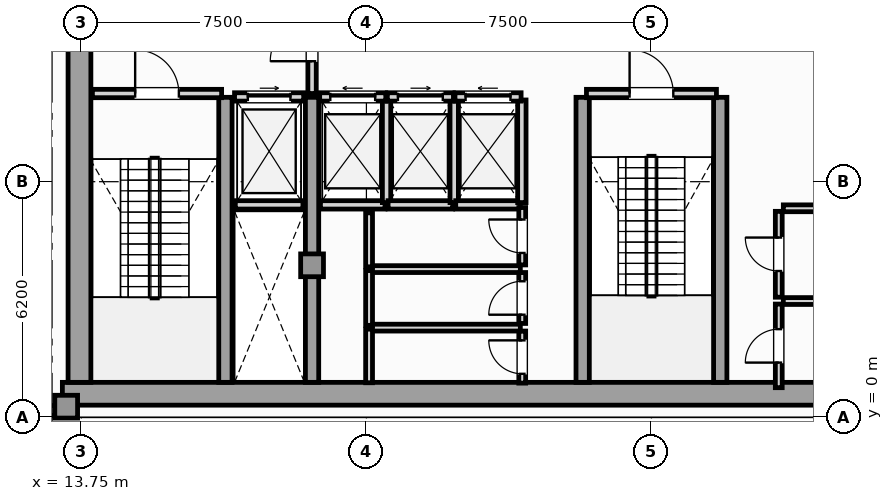
"""IFC4 building model, lengths in metres.
Left out: names, types, materials, properties, quantities, classifications, styles, units other than length and angle.
Written with IfcOpenShell. Run it as: python <this file> out.ifc"""

import sys

from ifc_helpers import new_model, si_unit, direction, frame, frame_2d, origin, origin_2d, place, context, subcontext, project, spatial, rectangle, extrude, element, fill, save


model = new_model("IFC4")
c1 = context("Model", 3, precision=1e-05, world=origin(), true_north=direction((0.0, 1.0)))
c2 = subcontext(c1, "Body", "Model", "MODEL_VIEW")
j1 = project(units=[si_unit("LENGTHUNIT", "METRE"), si_unit("PLANEANGLEUNIT", "RADIAN")], contexts=[c1])
p1 = place(None, origin())
s1 = spatial("IfcSite", under=j1, at=p1, CompositionType="ELEMENT")
p2 = place(p1, origin())
s2 = spatial("IfcBuilding", under=s1, at=p2, CompositionType="ELEMENT")
p3 = place(p2, frame((0.0, 0.0, 251.7)))
s3 = spatial("IfcBuildingStorey", under=s2, at=p3, CompositionType="ELEMENT", Elevation=251.7)
p4 = place(p3, frame((13.25, 0.62, 0.0), z_axis=(0.0, 0.0, 1.0), x_axis=(1.0, 0.0, 0.0)))
e1 = element("IfcWall", 1, at=p4, inside=s3, PredefinedType="SHEAR", context=c2, shape_type="SweptSolid", body=[
    extrude(rectangle(XDim=31.0, YDim=0.6, at=frame_2d((15.5, 0.0))), origin(), (0.0, 0.0, 1.0), 4.85),
])
p5 = place(p3, frame((13.7, 0.92, 0.0), z_axis=(0.0, 0.0, 1.0), x_axis=(0.0, 1.0, 0.0)))
e2 = element("IfcWall", 2, at=p5, inside=s3, PredefinedType="SHEAR", context=c2, shape_type="SweptSolid", body=[
    extrude(rectangle(XDim=10.53, YDim=0.6, at=frame_2d((5.265, 0.0))), origin(), (0.0, 0.0, 1.0), 4.85),
])
for number, where, z_axis, x_axis in (
    (3, (17.54, 0.92, 0.0), (0.0, 0.0, 1.0), (0.0, 1.0, 0.0)),
    (4, (19.82, 0.92, 0.0), (0.0, 0.0, 1.0), (0.0, 1.0, 0.0)),
    (5, (26.94, 0.92, 0.0), (0.0, 0.0, 1.0), (0.0, 1.0, 0.0)),
    (6, (30.56, 0.92, 0.0), (0.0, 0.0, 1.0), (0.0, 1.0, 0.0)),
):
    element("IfcWall", number, at=place(p3, frame(where, z_axis=z_axis, x_axis=x_axis)), inside=s3, PredefinedType="SHEAR", context=c2, shape_type="SweptSolid", body=[
        extrude(rectangle(XDim=7.5, YDim=0.35, at=frame_2d((3.75, 0.0))), origin(), (0.0, 0.0, 1.0), 4.85),
    ])
for number, where, z_axis, x_axis in (
    (7, (13.35, 0.28, 0.0), (0.0, 0.0, 1.0), (1.0, 0.0, 0.0)),
    (8, (19.82, 4.0, 0.0), (0.0, 0.0, 1.0), (1.0, 0.0, 0.0)),
):
    element("IfcColumn", number, at=place(p3, frame(where, z_axis=z_axis, x_axis=x_axis)), inside=s3, PredefinedType="COLUMN", context=c2, shape_type="SweptSolid", body=[
        extrude(rectangle(XDim=0.6, YDim=0.6, at=origin_2d()), origin(), (0.0, 0.0, 1.0), 5.05),
    ])
p6 = place(p3, frame((11.095, 0.18, 0.0), z_axis=(0.0, 0.0, 1.0), x_axis=(1.0, 0.0, 0.0)))
e9 = element("IfcWall", 9, at=p6, inside=s3, PredefinedType="SOLIDWALL", context=c2, shape_type="SweptSolid", body=[
    extrude(rectangle(XDim=2.155, YDim=0.26, at=frame_2d((1.077, 0.0))), origin(), (0.0, 0.0, 1.0), 4.85),
])
p7 = place(p3, frame((17.8, 5.59, 0.0), z_axis=(0.0, 0.0, 1.0), x_axis=(1.0, 0.0, 0.0)))
e10 = element("IfcWall", 10, at=p7, inside=s3, PredefinedType="SOLIDWALL", context=c2, shape_type="SweptSolid", body=[
    extrude(rectangle(XDim=1.78, YDim=0.22, at=frame_2d((0.89, 0.0))), origin(), (0.0, 0.0, 1.0), 4.85),
])
p8 = place(p3, frame((17.78, 8.43, 0.0), z_axis=(0.0, 0.0, 1.0), x_axis=(1.0, 0.0, 0.0)))
e11 = element("IfcWall", 11, at=p8, inside=s3, PredefinedType="SOLIDWALL", context=c2, shape_type="SweptSolid", body=[
    extrude(rectangle(XDim=1.82, YDim=0.22, at=frame_2d((0.91, 0.0))), origin(), (0.0, 0.0, 1.0), 4.85),
])
p9 = place(p8, frame((0.35, 0.0, 0.0)))
e12 = element("IfcOpeningElement", 12, at=p9, cuts=e11, PredefinedType="OPENING", context=c2, shape_type="SweptSolid", body=[
    extrude(rectangle(XDim=1.12, YDim=2.25, at=frame_2d((0.56, 1.125))), frame((0.0, 0.12, 0.0), z_axis=(0.0, -1.0, 0.0), x_axis=(1.0, 0.0, 0.0)), (0.0, 0.0, 1.0), 0.24),
])
p10 = place(p3, frame((20.04, 5.59, 0.0), z_axis=(0.0, 0.0, 1.0), x_axis=(1.0, 0.0, 0.0)))
e13 = element("IfcWall", 13, at=p10, inside=s3, PredefinedType="SOLIDWALL", context=c2, shape_type="SweptSolid", body=[
    extrude(rectangle(XDim=1.7, YDim=0.22, at=frame_2d((0.85, 0.0))), origin(), (0.0, 0.0, 1.0), 4.85),
])
p11 = place(p3, frame((21.78, 5.65, 0.0), z_axis=(0.0, 0.0, 1.0), x_axis=(0.0, 1.0, 0.0)))
e14 = element("IfcWall", 14, at=p11, inside=s3, PredefinedType="SOLIDWALL", context=c2, shape_type="SweptSolid", body=[
    extrude(rectangle(XDim=2.7, YDim=0.22, at=frame_2d((1.35, 0.0))), origin(), (0.0, 0.0, 1.0), 4.85),
])
p12 = place(p3, frame((20.02, 8.43, 0.0), z_axis=(0.0, 0.0, 1.0), x_axis=(1.0, 0.0, 0.0)))
e15 = element("IfcWall", 15, at=p12, inside=s3, PredefinedType="SOLIDWALL", context=c2, shape_type="SweptSolid", body=[
    extrude(rectangle(XDim=1.74, YDim=0.22, at=frame_2d((0.87, 0.0))), origin(), (0.0, 0.0, 1.0), 4.85),
])
p13 = place(p12, frame((0.28, 0.0, 0.0)))
e16 = element("IfcOpeningElement", 16, at=p13, cuts=e15, PredefinedType="OPENING", context=c2, shape_type="SweptSolid", body=[
    extrude(rectangle(XDim=1.18, YDim=2.2, at=frame_2d((0.59, 1.1))), frame((0.0, 0.12, 0.0), z_axis=(0.0, -1.0, 0.0), x_axis=(1.0, 0.0, 0.0)), (0.0, 0.0, 1.0), 0.24),
])
p14 = place(p3, frame((21.82, 5.59, 0.0), z_axis=(0.0, 0.0, 1.0), x_axis=(1.0, 0.0, 0.0)))
e17 = element("IfcWall", 17, at=p14, inside=s3, PredefinedType="SOLIDWALL", context=c2, shape_type="SweptSolid", body=[
    extrude(rectangle(XDim=1.7, YDim=0.22, at=frame_2d((0.85, 0.0))), origin(), (0.0, 0.0, 1.0), 4.85),
])
p15 = place(p3, frame((23.56, 5.65, 0.0), z_axis=(0.0, 0.0, 1.0), x_axis=(0.0, 1.0, 0.0)))
e18 = element("IfcWall", 18, at=p15, inside=s3, PredefinedType="SOLIDWALL", context=c2, shape_type="SweptSolid", body=[
    extrude(rectangle(XDim=2.7, YDim=0.22, at=frame_2d((1.35, 0.0))), origin(), (0.0, 0.0, 1.0), 4.85),
])
p16 = place(p3, frame((21.8, 8.43, 0.0), z_axis=(0.0, 0.0, 1.0), x_axis=(1.0, 0.0, 0.0)))
e19 = element("IfcWall", 19, at=p16, inside=s3, PredefinedType="SOLIDWALL", context=c2, shape_type="SweptSolid", body=[
    extrude(rectangle(XDim=1.74, YDim=0.22, at=frame_2d((0.87, 0.0))), origin(), (0.0, 0.0, 1.0), 4.85),
])
p17 = place(p16, frame((0.28, 0.0, 0.0)))
e20 = element("IfcOpeningElement", 20, at=p17, cuts=e19, PredefinedType="OPENING", context=c2, shape_type="SweptSolid", body=[
    extrude(rectangle(XDim=1.18, YDim=2.2, at=frame_2d((0.59, 1.1))), frame((0.0, 0.12, 0.0), z_axis=(0.0, -1.0, 0.0), x_axis=(1.0, 0.0, 0.0)), (0.0, 0.0, 1.0), 0.24),
])
p18 = place(p3, frame((23.6, 5.59, 0.0), z_axis=(0.0, 0.0, 1.0), x_axis=(1.0, 0.0, 0.0)))
e21 = element("IfcWall", 21, at=p18, inside=s3, PredefinedType="SOLIDWALL", context=c2, shape_type="SweptSolid", body=[
    extrude(rectangle(XDim=1.7, YDim=0.22, at=frame_2d((0.85, 0.0))), origin(), (0.0, 0.0, 1.0), 4.85),
])
p19 = place(p3, frame((25.34, 5.65, 0.0), z_axis=(0.0, 0.0, 1.0), x_axis=(0.0, 1.0, 0.0)))
e22 = element("IfcWall", 22, at=p19, inside=s3, PredefinedType="SOLIDWALL", context=c2, shape_type="SweptSolid", body=[
    extrude(rectangle(XDim=2.7, YDim=0.22, at=frame_2d((1.35, 0.0))), origin(), (0.0, 0.0, 1.0), 4.85),
])
p20 = place(p3, frame((23.58, 8.43, 0.0), z_axis=(0.0, 0.0, 1.0), x_axis=(1.0, 0.0, 0.0)))
e23 = element("IfcWall", 23, at=p20, inside=s3, PredefinedType="SOLIDWALL", context=c2, shape_type="SweptSolid", body=[
    extrude(rectangle(XDim=1.74, YDim=0.22, at=frame_2d((0.87, 0.0))), origin(), (0.0, 0.0, 1.0), 4.85),
])
p21 = place(p20, frame((0.28, 0.0, 0.0)))
e24 = element("IfcOpeningElement", 24, at=p21, cuts=e23, PredefinedType="OPENING", context=c2, shape_type="SweptSolid", body=[
    extrude(rectangle(XDim=1.18, YDim=2.2, at=frame_2d((0.59, 1.1))), frame((0.0, 0.12, 0.0), z_axis=(0.0, -1.0, 0.0), x_axis=(1.0, 0.0, 0.0)), (0.0, 0.0, 1.0), 0.24),
])
p22 = place(p3, frame((14.04, 8.52, 0.0), z_axis=(0.0, 0.0, 1.0), x_axis=(1.0, 0.0, 0.0)))
e25 = element("IfcWall", 25, at=p22, inside=s3, PredefinedType="SOLIDWALL", context=c2, shape_type="SweptSolid", body=[
    extrude(rectangle(XDim=3.4, YDim=0.22, at=frame_2d((1.7, 0.0))), origin(), (0.0, 0.0, 1.0), 4.85),
])
p23 = place(p22, frame((1.125, 0.0, 0.0)))
e26 = element("IfcOpeningElement", 26, at=p23, cuts=e25, PredefinedType="OPENING", context=c2, shape_type="SweptSolid", body=[
    extrude(rectangle(XDim=1.15, YDim=2.2, at=frame_2d((0.575, 1.1))), frame((0.0, 0.12, 0.0), z_axis=(0.0, -1.0, 0.0), x_axis=(1.0, 0.0, 0.0)), (0.0, 0.0, 1.0), 0.24),
])
p24 = place(p3, frame((27.04, 8.52, 0.0), z_axis=(0.0, 0.0, 1.0), x_axis=(1.0, 0.0, 0.0)))
e27 = element("IfcWall", 27, at=p24, inside=s3, PredefinedType="SOLIDWALL", context=c2, shape_type="SweptSolid", body=[
    extrude(rectangle(XDim=3.42, YDim=0.22, at=frame_2d((1.71, 0.0))), origin(), (0.0, 0.0, 1.0), 4.85),
])
p25 = place(p24, frame((1.135, 0.0, 0.0)))
e28 = element("IfcOpeningElement", 28, at=p25, cuts=e27, PredefinedType="OPENING", context=c2, shape_type="SweptSolid", body=[
    extrude(rectangle(XDim=1.15, YDim=2.2, at=frame_2d((0.575, 1.1))), frame((0.0, 0.12, 0.0), z_axis=(0.0, -1.0, 0.0), x_axis=(1.0, 0.0, 0.0)), (0.0, 0.0, 1.0), 0.24),
])
p26 = place(p3, frame((19.82, 8.52, 0.0), z_axis=(0.0, 0.0, 1.0), x_axis=(0.0, 1.0, 0.0)))
e29 = element("IfcWall", 29, at=p26, inside=s3, PredefinedType="SOLIDWALL", context=c2, shape_type="SweptSolid", body=[
    extrude(rectangle(XDim=2.8, YDim=0.22, at=frame_2d((1.4, 0.0))), origin(), (0.0, 0.0, 1.0), 4.306),
])
p27 = place(p26, frame((0.85, 0.0, 0.0)))
e30 = element("IfcOpeningElement", 30, at=p27, cuts=e29, PredefinedType="OPENING", context=c2, shape_type="SweptSolid", body=[
    extrude(rectangle(XDim=1.1, YDim=2.2, at=frame_2d((0.55, 1.1))), frame((0.0, 0.12, 0.0), z_axis=(0.0, -1.0, 0.0), x_axis=(1.0, 0.0, 0.0)), (0.0, 0.0, 1.0), 0.24),
])
p28 = place(p3, frame((25.35, 0.9, 0.0), z_axis=(0.0, 0.0, 1.0), x_axis=(0.0, 1.0, 0.0)))
e31 = element("IfcWall", 31, at=p28, inside=s3, PredefinedType="PARTITIONING", context=c2, shape_type="SweptSolid", body=[
    extrude(rectangle(XDim=1.37, YDim=0.18, at=frame_2d((0.685, 0.0))), origin(), (0.0, 0.0, 1.0), 4.85),
])
p29 = place(p28, frame((0.245, 0.0, 0.0)))
e32 = element("IfcOpeningElement", 32, at=p29, cuts=e31, PredefinedType="OPENING", context=c2, shape_type="SweptSolid", body=[
    extrude(rectangle(XDim=0.88, YDim=2.05, at=frame_2d((0.44, 1.025))), frame((0.0, 0.1, 0.0), z_axis=(0.0, -1.0, 0.0), x_axis=(1.0, 0.0, 0.0)), (0.0, 0.0, 1.0), 0.2),
])
p30 = place(p3, frame((21.36, 2.36, 0.0), z_axis=(0.0, 0.0, 1.0), x_axis=(1.0, 0.0, 0.0)))
e33 = element("IfcWall", 33, at=p30, inside=s3, PredefinedType="PARTITIONING", context=c2, shape_type="SweptSolid", body=[
    extrude(rectangle(XDim=3.94, YDim=0.18, at=frame_2d((1.97, 0.0))), origin(), (0.0, 0.0, 1.0), 4.85),
])
p31 = place(p3, frame((21.32, 0.91, 0.0), z_axis=(0.0, 0.0, 1.0), x_axis=(0.0, 1.0, 0.0)))
e34 = element("IfcWall", 34, at=p31, inside=s3, PredefinedType="PARTITIONING", context=c2, shape_type="SweptSolid", body=[
    extrude(rectangle(XDim=1.41, YDim=0.18, at=frame_2d((0.705, 0.0))), origin(), (0.0, 0.0, 1.0), 4.85),
])
p32 = place(p3, frame((25.35, 2.47, 0.0), z_axis=(0.0, 0.0, 1.0), x_axis=(0.0, 1.0, 0.0)))
e35 = element("IfcWall", 35, at=p32, inside=s3, PredefinedType="PARTITIONING", context=c2, shape_type="SweptSolid", body=[
    extrude(rectangle(XDim=1.34, YDim=0.18, at=frame_2d((0.67, 0.0))), origin(), (0.0, 0.0, 1.0), 4.85),
])
p33 = place(p32, frame((0.23, 0.0, 0.0)))
e36 = element("IfcOpeningElement", 36, at=p33, cuts=e35, PredefinedType="OPENING", context=c2, shape_type="SweptSolid", body=[
    extrude(rectangle(XDim=0.88, YDim=2.05, at=frame_2d((0.44, 1.025))), frame((0.0, 0.1, 0.0), z_axis=(0.0, -1.0, 0.0), x_axis=(1.0, 0.0, 0.0)), (0.0, 0.0, 1.0), 0.2),
])
p34 = place(p3, frame((21.36, 3.9, 0.0), z_axis=(0.0, 0.0, 1.0), x_axis=(1.0, 0.0, 0.0)))
e37 = element("IfcWall", 37, at=p34, inside=s3, PredefinedType="PARTITIONING", context=c2, shape_type="SweptSolid", body=[
    extrude(rectangle(XDim=3.94, YDim=0.18, at=frame_2d((1.97, 0.0))), origin(), (0.0, 0.0, 1.0), 4.85),
])
p35 = place(p3, frame((21.32, 2.42, 0.0), z_axis=(0.0, 0.0, 1.0), x_axis=(0.0, 1.0, 0.0)))
e38 = element("IfcWall", 38, at=p35, inside=s3, PredefinedType="PARTITIONING", context=c2, shape_type="SweptSolid", body=[
    extrude(rectangle(XDim=1.44, YDim=0.18, at=frame_2d((0.72, 0.0))), origin(), (0.0, 0.0, 1.0), 4.85),
])
p36 = place(p3, frame((25.35, 4.01, 0.0), z_axis=(0.0, 0.0, 1.0), x_axis=(0.0, 1.0, 0.0)))
e39 = element("IfcWall", 39, at=p36, inside=s3, PredefinedType="PARTITIONING", context=c2, shape_type="SweptSolid", body=[
    extrude(rectangle(XDim=1.51, YDim=0.18, at=frame_2d((0.755, 0.0))), origin(), (0.0, 0.0, 1.0), 4.85),
])
p37 = place(p36, frame((0.315, 0.0, 0.0)))
e40 = element("IfcOpeningElement", 40, at=p37, cuts=e39, PredefinedType="OPENING", context=c2, shape_type="SweptSolid", body=[
    extrude(rectangle(XDim=0.88, YDim=2.05, at=frame_2d((0.44, 1.025))), frame((0.0, 0.1, 0.0), z_axis=(0.0, -1.0, 0.0), x_axis=(1.0, 0.0, 0.0)), (0.0, 0.0, 1.0), 0.2),
])
p38 = place(p3, frame((21.32, 3.96, 0.0), z_axis=(0.0, 0.0, 1.0), x_axis=(0.0, 1.0, 0.0)))
e41 = element("IfcWall", 41, at=p38, inside=s3, PredefinedType="PARTITIONING", context=c2, shape_type="SweptSolid", body=[
    extrude(rectangle(XDim=1.42, YDim=0.18, at=frame_2d((0.71, 0.0))), origin(), (0.0, 0.0, 1.0), 4.85),
])
p39 = place(p3, frame((32.1, 0.78, 0.0), z_axis=(0.0, 0.0, 1.0), x_axis=(0.0, 1.0, 0.0)))
e42 = element("IfcWall", 42, at=p39, inside=s3, PredefinedType="PARTITIONING", context=c2, shape_type="SweptSolid", body=[
    extrude(rectangle(XDim=2.2, YDim=0.18, at=frame_2d((1.1, 0.0))), origin(), (0.0, 0.0, 1.0), 4.85),
])
p40 = place(p39, frame((0.66, 0.0, 0.0)))
e43 = element("IfcOpeningElement", 43, at=p40, cuts=e42, PredefinedType="OPENING", context=c2, shape_type="SweptSolid", body=[
    extrude(rectangle(XDim=0.88, YDim=2.05, at=frame_2d((0.44, 1.025))), frame((0.0, 0.1, 0.0), z_axis=(0.0, -1.0, 0.0), x_axis=(1.0, 0.0, 0.0)), (0.0, 0.0, 1.0), 0.2),
])
p41 = place(p3, frame((32.22, 3.06, 0.0), z_axis=(0.0, 0.0, 1.0), x_axis=(1.0, 0.0, 0.0)))
e44 = element("IfcWall", 44, at=p41, inside=s3, PredefinedType="PARTITIONING", context=c2, shape_type="SweptSolid", body=[
    extrude(rectangle(XDim=5.18, YDim=0.18, at=frame_2d((2.59, 0.0))), origin(), (0.0, 0.0, 1.0), 4.85),
])
p42 = place(p3, frame((32.1, 3.16, 0.0), z_axis=(0.0, 0.0, 1.0), x_axis=(0.0, 1.0, 0.0)))
e45 = element("IfcWall", 45, at=p42, inside=s3, PredefinedType="PARTITIONING", context=c2, shape_type="SweptSolid", body=[
    extrude(rectangle(XDim=2.26, YDim=0.18, at=frame_2d((1.13, 0.0))), origin(), (0.0, 0.0, 1.0), 4.85),
])
p43 = place(p42, frame((0.69, 0.0, 0.0)))
e46 = element("IfcOpeningElement", 46, at=p43, cuts=e45, PredefinedType="OPENING", context=c2, shape_type="SweptSolid", body=[
    extrude(rectangle(XDim=0.88, YDim=2.05, at=frame_2d((0.44, 1.025))), frame((0.0, 0.1, 0.0), z_axis=(0.0, -1.0, 0.0), x_axis=(1.0, 0.0, 0.0)), (0.0, 0.0, 1.0), 0.2),
])
p44 = place(p3, frame((32.22, 5.5, 0.0), z_axis=(0.0, 0.0, 1.0), x_axis=(1.0, 0.0, 0.0)))
e47 = element("IfcWall", 47, at=p44, inside=s3, PredefinedType="PARTITIONING", context=c2, shape_type="SweptSolid", body=[
    extrude(rectangle(XDim=2.9, YDim=0.18, at=frame_2d((1.45, 0.0))), origin(), (0.0, 0.0, 1.0), 4.85),
])
p45 = place(p9, origin())
e48 = element("IfcDoor", 48, at=p45, inside=s3, OperationType="SLIDING_TO_RIGHT", PredefinedType="DOOR", context=c2, shape_type="SweptSolid", body=[
    extrude(rectangle(XDim=1.12, YDim=2.25, at=frame_2d((0.56, 1.125))), frame((0.0, 0.025, 0.0), z_axis=(0.0, -1.0, 0.0), x_axis=(1.0, 0.0, 0.0)), (0.0, 0.0, 1.0), 0.05),
])
fill(e12, e48)
p46 = place(p13, origin())
e49 = element("IfcDoor", 49, at=p46, inside=s3, OperationType="SLIDING_TO_LEFT", PredefinedType="DOOR", context=c2, shape_type="SweptSolid", body=[
    extrude(rectangle(XDim=1.18, YDim=2.2, at=frame_2d((0.59, 1.1))), frame((0.0, 0.025, 0.0), z_axis=(0.0, -1.0, 0.0), x_axis=(1.0, 0.0, 0.0)), (0.0, 0.0, 1.0), 0.05),
])
fill(e16, e49)
p47 = place(p17, origin())
e50 = element("IfcDoor", 50, at=p47, inside=s3, OperationType="SLIDING_TO_RIGHT", PredefinedType="DOOR", context=c2, shape_type="SweptSolid", body=[
    extrude(rectangle(XDim=1.18, YDim=2.2, at=frame_2d((0.59, 1.1))), frame((0.0, 0.025, 0.0), z_axis=(0.0, -1.0, 0.0), x_axis=(1.0, 0.0, 0.0)), (0.0, 0.0, 1.0), 0.05),
])
fill(e20, e50)
p48 = place(p21, origin())
e51 = element("IfcDoor", 51, at=p48, inside=s3, OperationType="SLIDING_TO_LEFT", PredefinedType="DOOR", context=c2, shape_type="SweptSolid", body=[
    extrude(rectangle(XDim=1.18, YDim=2.2, at=frame_2d((0.59, 1.1))), frame((0.0, 0.025, 0.0), z_axis=(0.0, -1.0, 0.0), x_axis=(1.0, 0.0, 0.0)), (0.0, 0.0, 1.0), 0.05),
])
fill(e24, e51)
p49 = place(p23, origin())
e52 = element("IfcDoor", 52, at=p49, inside=s3, OperationType="SINGLE_SWING_LEFT", PredefinedType="DOOR", context=c2, shape_type="SweptSolid", body=[
    extrude(rectangle(XDim=1.15, YDim=2.2, at=frame_2d((0.575, 1.1))), frame((0.0, 0.025, 0.0), z_axis=(0.0, -1.0, 0.0), x_axis=(1.0, 0.0, 0.0)), (0.0, 0.0, 1.0), 0.05),
])
fill(e26, e52)
p50 = place(p25, origin())
e53 = element("IfcDoor", 53, at=p50, inside=s3, OperationType="SINGLE_SWING_LEFT", PredefinedType="DOOR", context=c2, shape_type="SweptSolid", body=[
    extrude(rectangle(XDim=1.15, YDim=2.2, at=frame_2d((0.575, 1.1))), frame((0.0, 0.025, 0.0), z_axis=(0.0, -1.0, 0.0), x_axis=(1.0, 0.0, 0.0)), (0.0, 0.0, 1.0), 0.05),
])
fill(e28, e53)
p51 = place(p27, origin())
e54 = element("IfcDoor", 54, at=p51, inside=s3, OperationType="SINGLE_SWING_LEFT", PredefinedType="DOOR", context=c2, shape_type="SweptSolid", body=[
    extrude(rectangle(XDim=1.1, YDim=2.2, at=frame_2d((0.55, 1.1))), frame((0.0, 0.025, 0.0), z_axis=(0.0, -1.0, 0.0), x_axis=(1.0, 0.0, 0.0)), (0.0, 0.0, 1.0), 0.05),
])
fill(e30, e54)
p52 = place(p29, origin())
e55 = element("IfcDoor", 55, at=p52, inside=s3, OperationType="SINGLE_SWING_RIGHT", PredefinedType="DOOR", context=c2, shape_type="SweptSolid", body=[
    extrude(rectangle(XDim=0.88, YDim=2.05, at=frame_2d((0.44, 1.025))), frame((0.0, 0.025, 0.0), z_axis=(0.0, -1.0, 0.0), x_axis=(1.0, 0.0, 0.0)), (0.0, 0.0, 1.0), 0.05),
])
fill(e32, e55)
p53 = place(p33, origin())
e56 = element("IfcDoor", 56, at=p53, inside=s3, OperationType="SINGLE_SWING_LEFT", PredefinedType="DOOR", context=c2, shape_type="SweptSolid", body=[
    extrude(rectangle(XDim=0.88, YDim=2.05, at=frame_2d((0.44, 1.025))), frame((0.0, 0.025, 0.0), z_axis=(0.0, -1.0, 0.0), x_axis=(1.0, 0.0, 0.0)), (0.0, 0.0, 1.0), 0.05),
])
fill(e36, e56)
p54 = place(p37, origin())
e57 = element("IfcDoor", 57, at=p54, inside=s3, OperationType="SINGLE_SWING_RIGHT", PredefinedType="DOOR", context=c2, shape_type="SweptSolid", body=[
    extrude(rectangle(XDim=0.88, YDim=2.05, at=frame_2d((0.44, 1.025))), frame((0.0, 0.025, 0.0), z_axis=(0.0, -1.0, 0.0), x_axis=(1.0, 0.0, 0.0)), (0.0, 0.0, 1.0), 0.05),
])
fill(e40, e57)
p55 = place(p40, origin())
e58 = element("IfcDoor", 58, at=p55, inside=s3, OperationType="SINGLE_SWING_LEFT", PredefinedType="DOOR", context=c2, shape_type="SweptSolid", body=[
    extrude(rectangle(XDim=0.88, YDim=2.05, at=frame_2d((0.44, 1.025))), frame((0.0, 0.025, 0.0), z_axis=(0.0, -1.0, 0.0), x_axis=(1.0, 0.0, 0.0)), (0.0, 0.0, 1.0), 0.05),
])
fill(e43, e58)
p56 = place(p43, origin())
e59 = element("IfcDoor", 59, at=p56, inside=s3, OperationType="SINGLE_SWING_RIGHT", PredefinedType="DOOR", context=c2, shape_type="SweptSolid", body=[
    extrude(rectangle(XDim=0.88, YDim=2.05, at=frame_2d((0.44, 1.025))), frame((0.0, 0.025, 0.0), z_axis=(0.0, -1.0, 0.0), x_axis=(1.0, 0.0, 0.0)), (0.0, 0.0, 1.0), 0.05),
])
fill(e46, e59)
save(model, sys.argv[1])
